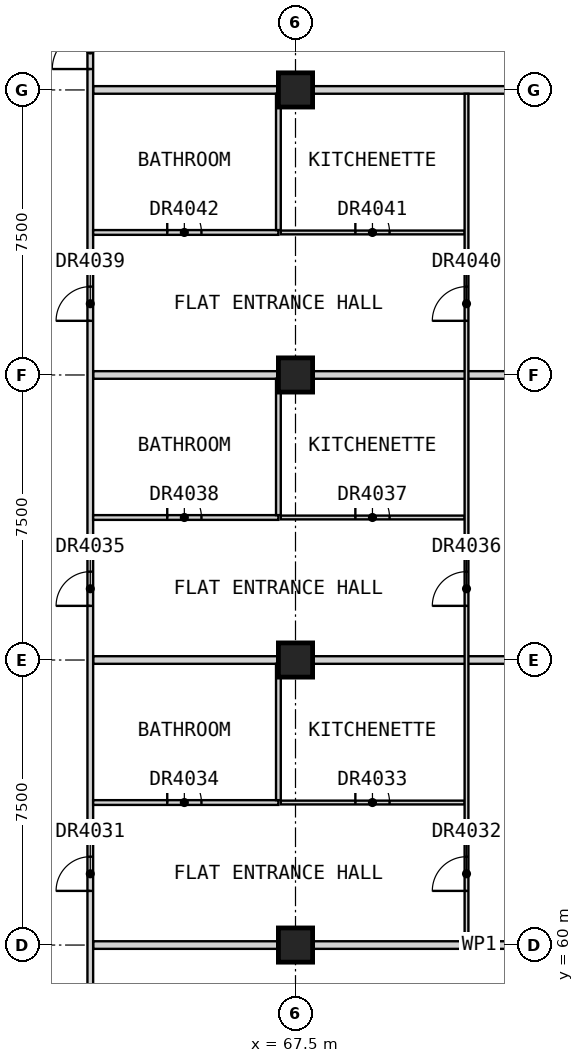
"""IFC4 building model, lengths in metres.
Left out: names, types, materials, properties, quantities, classifications, styles, units other than length and angle.
Written with IfcOpenShell. Run it as: python <this file> out.ifc"""

import sys

from ifc_helpers import new_model, si_unit, direction, frame, frame_2d, origin, origin_2d, place, context, subcontext, project, spatial, rectangle, extrude, element, fill, save


model = new_model("IFC4")
c1 = context("Model", 3, precision=1e-05, world=origin(), true_north=direction((0.0, 1.0)))
c2 = subcontext(c1, "Body", "Model", "MODEL_VIEW")
j1 = project(units=[si_unit("LENGTHUNIT", "METRE"), si_unit("PLANEANGLEUNIT", "RADIAN")], contexts=[c1])
p1 = place(None, origin())
s1 = spatial("IfcSite", under=j1, at=p1, CompositionType="ELEMENT")
p2 = place(p1, origin())
s2 = spatial("IfcBuilding", under=s1, at=p2, CompositionType="ELEMENT")
p3 = place(p2, frame((0.0, 0.0, 189.7)))
s3 = spatial("IfcBuildingStorey", under=s2, at=p3, CompositionType="ELEMENT", Elevation=189.7)
for number, where, z_axis, x_axis in (
    (1, (67.5, 60.0, 0.0), (0.0, 0.0, 1.0), (1.0, 0.0, 0.0)),
    (2, (67.5, 67.5, 0.0), (0.0, 0.0, 1.0), (1.0, 0.0, 0.0)),
    (3, (67.5, 75.0, 0.0), (0.0, 0.0, 1.0), (1.0, 0.0, 0.0)),
    (4, (67.5, 82.5, 0.0), (0.0, 0.0, 1.0), (1.0, 0.0, 0.0)),
):
    element("IfcColumn", number, at=place(p3, frame(where, z_axis=z_axis, x_axis=x_axis)), inside=s3, PredefinedType="COLUMN", context=c2, shape_type="SweptSolid", body=[
        extrude(rectangle(XDim=0.9, YDim=0.9, at=origin_2d()), origin(), (0.0, 0.0, 1.0), 3.5),
    ])
for number, where, z_axis, x_axis in (
    (5, (62.175, 60.0, 0.0), (0.0, 0.0, 1.0), (1.0, 0.0, 0.0)),
    (6, (62.175, 67.5, 0.0), (0.0, 0.0, 1.0), (1.0, 0.0, 0.0)),
    (7, (62.175, 75.0, 0.0), (0.0, 0.0, 1.0), (1.0, 0.0, 0.0)),
    (8, (62.175, 82.5, 0.0), (0.0, 0.0, 1.0), (1.0, 0.0, 0.0)),
):
    element("IfcWall", number, at=place(p3, frame(where, z_axis=z_axis, x_axis=x_axis)), inside=s3, PredefinedType="PARTITIONING", context=c2, shape_type="SweptSolid", body=[
        extrude(rectangle(XDim=20.325, YDim=0.2, at=frame_2d((10.163, 0.0))), origin(), (0.0, 0.0, 1.0), 3.25),
    ])
p4 = place(p3, frame((62.1, 57.975, 0.0), z_axis=(0.0, 0.0, 1.0), x_axis=(0.0, 1.0, 0.0)))
e9 = element("IfcWall", 9, at=p4, inside=s3, PredefinedType="PARTITIONING", context=c2, shape_type="SweptSolid", body=[
    extrude(rectangle(XDim=26.55, YDim=0.15, at=frame_2d((13.275, 0.0))), origin(), (0.0, 0.0, 1.0), 3.25),
])
p5 = place(p4, frame((25.075, 0.0, 0.0)))
e10 = element("IfcOpeningElement", 10, at=p5, cuts=e9, PredefinedType="OPENING", context=c2, shape_type="SweptSolid", body=[
    extrude(rectangle(XDim=1.0, YDim=2.1, at=frame_2d((0.5, 1.05))), frame((0.0, 0.085, 0.0), z_axis=(0.0, -1.0, 0.0), x_axis=(1.0, 0.0, 0.0)), (0.0, 0.0, 1.0), 0.17),
])
p6 = place(p4, frame((3.45, 0.0, 0.0)))
e11 = element("IfcOpeningElement", 11, at=p6, cuts=e9, PredefinedType="OPENING", context=c2, shape_type="SweptSolid", body=[
    extrude(rectangle(XDim=0.9, YDim=2.1, at=frame_2d((0.45, 1.05))), frame((0.0, 0.085, 0.0), z_axis=(0.0, -1.0, 0.0), x_axis=(1.0, 0.0, 0.0)), (0.0, 0.0, 1.0), 0.17),
])
p7 = place(p4, frame((10.95, 0.0, 0.0)))
e12 = element("IfcOpeningElement", 12, at=p7, cuts=e9, PredefinedType="OPENING", context=c2, shape_type="SweptSolid", body=[
    extrude(rectangle(XDim=0.9, YDim=2.1, at=frame_2d((0.45, 1.05))), frame((0.0, 0.085, 0.0), z_axis=(0.0, -1.0, 0.0), x_axis=(1.0, 0.0, 0.0)), (0.0, 0.0, 1.0), 0.17),
])
p8 = place(p4, frame((18.45, 0.0, 0.0)))
e13 = element("IfcOpeningElement", 13, at=p8, cuts=e9, PredefinedType="OPENING", context=c2, shape_type="SweptSolid", body=[
    extrude(rectangle(XDim=0.9, YDim=2.1, at=frame_2d((0.45, 1.05))), frame((0.0, 0.085, 0.0), z_axis=(0.0, -1.0, 0.0), x_axis=(1.0, 0.0, 0.0)), (0.0, 0.0, 1.0), 0.17),
])
p9 = place(p3, frame((67.113, 63.75, 0.0), z_axis=(0.0, 0.0, 1.0), x_axis=(1.0, 0.0, 0.0)))
e14 = element("IfcWall", 14, at=p9, inside=s3, PredefinedType="PARTITIONING", context=c2, shape_type="SweptSolid", body=[
    extrude(rectangle(XDim=4.837, YDim=0.1, at=frame_2d((2.419, 0.0))), origin(), (0.0, 0.0, 1.0), 3.25),
])
p10 = place(p9, frame((1.962, 0.0, 0.0)))
e15 = element("IfcOpeningElement", 15, at=p10, cuts=e14, PredefinedType="OPENING", context=c2, shape_type="SweptSolid", body=[
    extrude(rectangle(XDim=0.9, YDim=2.1, at=frame_2d((0.45, 1.05))), frame((0.0, 0.06, 0.0), z_axis=(0.0, -1.0, 0.0), x_axis=(1.0, 0.0, 0.0)), (0.0, 0.0, 1.0), 0.12),
])
p11 = place(p3, frame((67.113, 71.25, 0.0), z_axis=(0.0, 0.0, 1.0), x_axis=(1.0, 0.0, 0.0)))
e16 = element("IfcWall", 16, at=p11, inside=s3, PredefinedType="PARTITIONING", context=c2, shape_type="SweptSolid", body=[
    extrude(rectangle(XDim=4.837, YDim=0.1, at=frame_2d((2.419, 0.0))), origin(), (0.0, 0.0, 1.0), 3.25),
])
p12 = place(p11, frame((1.962, 0.0, 0.0)))
e17 = element("IfcOpeningElement", 17, at=p12, cuts=e16, PredefinedType="OPENING", context=c2, shape_type="SweptSolid", body=[
    extrude(rectangle(XDim=0.9, YDim=2.1, at=frame_2d((0.45, 1.05))), frame((0.0, 0.06, 0.0), z_axis=(0.0, -1.0, 0.0), x_axis=(1.0, 0.0, 0.0)), (0.0, 0.0, 1.0), 0.12),
])
p13 = place(p3, frame((67.113, 78.75, 0.0), z_axis=(0.0, 0.0, 1.0), x_axis=(1.0, 0.0, 0.0)))
e18 = element("IfcWall", 18, at=p13, inside=s3, PredefinedType="PARTITIONING", context=c2, shape_type="SweptSolid", body=[
    extrude(rectangle(XDim=4.837, YDim=0.1, at=frame_2d((2.419, 0.0))), origin(), (0.0, 0.0, 1.0), 3.25),
])
p14 = place(p13, frame((1.962, 0.0, 0.0)))
e19 = element("IfcOpeningElement", 19, at=p14, cuts=e18, PredefinedType="OPENING", context=c2, shape_type="SweptSolid", body=[
    extrude(rectangle(XDim=0.9, YDim=2.1, at=frame_2d((0.45, 1.05))), frame((0.0, 0.06, 0.0), z_axis=(0.0, -1.0, 0.0), x_axis=(1.0, 0.0, 0.0)), (0.0, 0.0, 1.0), 0.12),
])
p15 = place(p3, frame((72.0, 60.1, 0.0), z_axis=(0.0, 0.0, 1.0), x_axis=(0.0, 1.0, 0.0)))
e20 = element("IfcWall", 20, at=p15, inside=s3, PredefinedType="PARTITIONING", context=c2, shape_type="SweptSolid", body=[
    extrude(rectangle(XDim=22.3, YDim=0.1, at=frame_2d((11.15, 0.0))), origin(), (0.0, 0.0, 1.0), 3.25),
])
p16 = place(p15, frame((1.325, 0.0, 0.0)))
e21 = element("IfcOpeningElement", 21, at=p16, cuts=e20, PredefinedType="OPENING", context=c2, shape_type="SweptSolid", body=[
    extrude(rectangle(XDim=0.9, YDim=2.1, at=frame_2d((0.45, 1.05))), frame((0.0, 0.06, 0.0), z_axis=(0.0, -1.0, 0.0), x_axis=(1.0, 0.0, 0.0)), (0.0, 0.0, 1.0), 0.12),
])
p17 = place(p15, frame((8.825, 0.0, 0.0)))
e22 = element("IfcOpeningElement", 22, at=p17, cuts=e20, PredefinedType="OPENING", context=c2, shape_type="SweptSolid", body=[
    extrude(rectangle(XDim=0.9, YDim=2.1, at=frame_2d((0.45, 1.05))), frame((0.0, 0.06, 0.0), z_axis=(0.0, -1.0, 0.0), x_axis=(1.0, 0.0, 0.0)), (0.0, 0.0, 1.0), 0.12),
])
p18 = place(p15, frame((16.325, 0.0, 0.0)))
e23 = element("IfcOpeningElement", 23, at=p18, cuts=e20, PredefinedType="OPENING", context=c2, shape_type="SweptSolid", body=[
    extrude(rectangle(XDim=0.9, YDim=2.1, at=frame_2d((0.45, 1.05))), frame((0.0, 0.06, 0.0), z_axis=(0.0, -1.0, 0.0), x_axis=(1.0, 0.0, 0.0)), (0.0, 0.0, 1.0), 0.12),
])
p19 = place(p3, frame((62.175, 63.75, 0.0), z_axis=(0.0, 0.0, 1.0), x_axis=(1.0, 0.0, 0.0)))
e24 = element("IfcWall", 24, at=p19, inside=s3, PredefinedType="PARTITIONING", context=c2, shape_type="SweptSolid", body=[
    extrude(rectangle(XDim=4.875, YDim=0.125, at=frame_2d((2.438, 0.0))), origin(), (0.0, 0.0, 1.0), 3.25),
])
p20 = place(p19, frame((1.95, 0.0, 0.0)))
e25 = element("IfcOpeningElement", 25, at=p20, cuts=e24, PredefinedType="OPENING", context=c2, shape_type="SweptSolid", body=[
    extrude(rectangle(XDim=0.9, YDim=2.1, at=frame_2d((0.45, 1.05))), frame((0.0, 0.073, 0.0), z_axis=(0.0, -1.0, 0.0), x_axis=(1.0, 0.0, 0.0)), (0.0, 0.0, 1.0), 0.145),
])
p21 = place(p3, frame((62.175, 71.25, 0.0), z_axis=(0.0, 0.0, 1.0), x_axis=(1.0, 0.0, 0.0)))
e26 = element("IfcWall", 26, at=p21, inside=s3, PredefinedType="PARTITIONING", context=c2, shape_type="SweptSolid", body=[
    extrude(rectangle(XDim=4.875, YDim=0.125, at=frame_2d((2.438, 0.0))), origin(), (0.0, 0.0, 1.0), 3.25),
])
p22 = place(p21, frame((1.95, 0.0, 0.0)))
e27 = element("IfcOpeningElement", 27, at=p22, cuts=e26, PredefinedType="OPENING", context=c2, shape_type="SweptSolid", body=[
    extrude(rectangle(XDim=0.9, YDim=2.1, at=frame_2d((0.45, 1.05))), frame((0.0, 0.073, 0.0), z_axis=(0.0, -1.0, 0.0), x_axis=(1.0, 0.0, 0.0)), (0.0, 0.0, 1.0), 0.145),
])
p23 = place(p3, frame((62.175, 78.75, 0.0), z_axis=(0.0, 0.0, 1.0), x_axis=(1.0, 0.0, 0.0)))
e28 = element("IfcWall", 28, at=p23, inside=s3, PredefinedType="PARTITIONING", context=c2, shape_type="SweptSolid", body=[
    extrude(rectangle(XDim=4.875, YDim=0.125, at=frame_2d((2.438, 0.0))), origin(), (0.0, 0.0, 1.0), 3.25),
])
p24 = place(p23, frame((1.95, 0.0, 0.0)))
e29 = element("IfcOpeningElement", 29, at=p24, cuts=e28, PredefinedType="OPENING", context=c2, shape_type="SweptSolid", body=[
    extrude(rectangle(XDim=0.9, YDim=2.1, at=frame_2d((0.45, 1.05))), frame((0.0, 0.073, 0.0), z_axis=(0.0, -1.0, 0.0), x_axis=(1.0, 0.0, 0.0)), (0.0, 0.0, 1.0), 0.145),
])
for number, where, z_axis, x_axis in (
    (30, (67.05, 63.812, 0.0), (0.0, 0.0, 1.0), (0.0, 1.0, 0.0)),
    (31, (67.05, 71.312, 0.0), (0.0, 0.0, 1.0), (0.0, 1.0, 0.0)),
    (32, (67.05, 78.812, 0.0), (0.0, 0.0, 1.0), (0.0, 1.0, 0.0)),
):
    element("IfcWall", number, at=place(p3, frame(where, z_axis=z_axis, x_axis=x_axis)), inside=s3, PredefinedType="PARTITIONING", context=c2, shape_type="SweptSolid", body=[
        extrude(rectangle(XDim=3.587, YDim=0.125, at=frame_2d((1.794, 0.0))), origin(), (0.0, 0.0, 1.0), 3.25),
    ])
p25 = place(p5, origin())
e33 = element("IfcDoor", 33, at=p25, inside=s3, OperationType="SINGLE_SWING_RIGHT", PredefinedType="DOOR", context=c2, shape_type="SweptSolid", body=[
    extrude(rectangle(XDim=1.0, YDim=2.1, at=frame_2d((0.5, 1.05))), frame((0.0, 0.025, 0.0), z_axis=(0.0, -1.0, 0.0), x_axis=(1.0, 0.0, 0.0)), (0.0, 0.0, 1.0), 0.05),
])
fill(e10, e33)
p26 = place(p6, origin())
e34 = element("IfcDoor", 34, at=p26, inside=s3, OperationType="SINGLE_SWING_RIGHT", PredefinedType="DOOR", context=c2, shape_type="SweptSolid", body=[
    extrude(rectangle(XDim=0.9, YDim=2.1, at=frame_2d((0.45, 1.05))), frame((0.0, 0.025, 0.0), z_axis=(0.0, -1.0, 0.0), x_axis=(1.0, 0.0, 0.0)), (0.0, 0.0, 1.0), 0.05),
])
fill(e11, e34)
p27 = place(p16, origin())
e35 = element("IfcDoor", 35, at=p27, inside=s3, OperationType="SINGLE_SWING_LEFT", PredefinedType="DOOR", context=c2, shape_type="SweptSolid", body=[
    extrude(rectangle(XDim=0.9, YDim=2.1, at=frame_2d((0.45, 1.05))), frame((0.0, 0.025, 0.0), z_axis=(0.0, -1.0, 0.0), x_axis=(1.0, 0.0, 0.0)), (0.0, 0.0, 1.0), 0.05),
])
fill(e21, e35)
p28 = place(p10, origin())
e36 = element("IfcDoor", 36, at=p28, inside=s3, OperationType="SINGLE_SWING_LEFT", PredefinedType="DOOR", context=c2, shape_type="SweptSolid", body=[
    extrude(rectangle(XDim=0.9, YDim=2.1, at=frame_2d((0.45, 1.05))), frame((0.0, 0.025, 0.0), z_axis=(0.0, -1.0, 0.0), x_axis=(1.0, 0.0, 0.0)), (0.0, 0.0, 1.0), 0.05),
])
fill(e15, e36)
p29 = place(p20, origin())
e37 = element("IfcDoor", 37, at=p29, inside=s3, OperationType="SINGLE_SWING_RIGHT", PredefinedType="DOOR", context=c2, shape_type="SweptSolid", body=[
    extrude(rectangle(XDim=0.9, YDim=2.1, at=frame_2d((0.45, 1.05))), frame((0.0, 0.025, 0.0), z_axis=(0.0, -1.0, 0.0), x_axis=(1.0, 0.0, 0.0)), (0.0, 0.0, 1.0), 0.05),
])
fill(e25, e37)
p30 = place(p7, origin())
e38 = element("IfcDoor", 38, at=p30, inside=s3, OperationType="SINGLE_SWING_RIGHT", PredefinedType="DOOR", context=c2, shape_type="SweptSolid", body=[
    extrude(rectangle(XDim=0.9, YDim=2.1, at=frame_2d((0.45, 1.05))), frame((0.0, 0.025, 0.0), z_axis=(0.0, -1.0, 0.0), x_axis=(1.0, 0.0, 0.0)), (0.0, 0.0, 1.0), 0.05),
])
fill(e12, e38)
p31 = place(p17, origin())
e39 = element("IfcDoor", 39, at=p31, inside=s3, OperationType="SINGLE_SWING_LEFT", PredefinedType="DOOR", context=c2, shape_type="SweptSolid", body=[
    extrude(rectangle(XDim=0.9, YDim=2.1, at=frame_2d((0.45, 1.05))), frame((0.0, 0.025, 0.0), z_axis=(0.0, -1.0, 0.0), x_axis=(1.0, 0.0, 0.0)), (0.0, 0.0, 1.0), 0.05),
])
fill(e22, e39)
p32 = place(p12, origin())
e40 = element("IfcDoor", 40, at=p32, inside=s3, OperationType="SINGLE_SWING_LEFT", PredefinedType="DOOR", context=c2, shape_type="SweptSolid", body=[
    extrude(rectangle(XDim=0.9, YDim=2.1, at=frame_2d((0.45, 1.05))), frame((0.0, 0.025, 0.0), z_axis=(0.0, -1.0, 0.0), x_axis=(1.0, 0.0, 0.0)), (0.0, 0.0, 1.0), 0.05),
])
fill(e17, e40)
p33 = place(p22, origin())
e41 = element("IfcDoor", 41, at=p33, inside=s3, OperationType="SINGLE_SWING_RIGHT", PredefinedType="DOOR", context=c2, shape_type="SweptSolid", body=[
    extrude(rectangle(XDim=0.9, YDim=2.1, at=frame_2d((0.45, 1.05))), frame((0.0, 0.025, 0.0), z_axis=(0.0, -1.0, 0.0), x_axis=(1.0, 0.0, 0.0)), (0.0, 0.0, 1.0), 0.05),
])
fill(e27, e41)
p34 = place(p8, origin())
e42 = element("IfcDoor", 42, at=p34, inside=s3, OperationType="SINGLE_SWING_RIGHT", PredefinedType="DOOR", context=c2, shape_type="SweptSolid", body=[
    extrude(rectangle(XDim=0.9, YDim=2.1, at=frame_2d((0.45, 1.05))), frame((0.0, 0.025, 0.0), z_axis=(0.0, -1.0, 0.0), x_axis=(1.0, 0.0, 0.0)), (0.0, 0.0, 1.0), 0.05),
])
fill(e13, e42)
p35 = place(p18, origin())
e43 = element("IfcDoor", 43, at=p35, inside=s3, OperationType="SINGLE_SWING_LEFT", PredefinedType="DOOR", context=c2, shape_type="SweptSolid", body=[
    extrude(rectangle(XDim=0.9, YDim=2.1, at=frame_2d((0.45, 1.05))), frame((0.0, 0.025, 0.0), z_axis=(0.0, -1.0, 0.0), x_axis=(1.0, 0.0, 0.0)), (0.0, 0.0, 1.0), 0.05),
])
fill(e23, e43)
p36 = place(p14, origin())
e44 = element("IfcDoor", 44, at=p36, inside=s3, OperationType="SINGLE_SWING_LEFT", PredefinedType="DOOR", context=c2, shape_type="SweptSolid", body=[
    extrude(rectangle(XDim=0.9, YDim=2.1, at=frame_2d((0.45, 1.05))), frame((0.0, 0.025, 0.0), z_axis=(0.0, -1.0, 0.0), x_axis=(1.0, 0.0, 0.0)), (0.0, 0.0, 1.0), 0.05),
])
fill(e19, e44)
p37 = place(p24, origin())
e45 = element("IfcDoor", 45, at=p37, inside=s3, OperationType="SINGLE_SWING_RIGHT", PredefinedType="DOOR", context=c2, shape_type="SweptSolid", body=[
    extrude(rectangle(XDim=0.9, YDim=2.1, at=frame_2d((0.45, 1.05))), frame((0.0, 0.025, 0.0), z_axis=(0.0, -1.0, 0.0), x_axis=(1.0, 0.0, 0.0)), (0.0, 0.0, 1.0), 0.05),
])
fill(e29, e45)
save(model, sys.argv[1])
